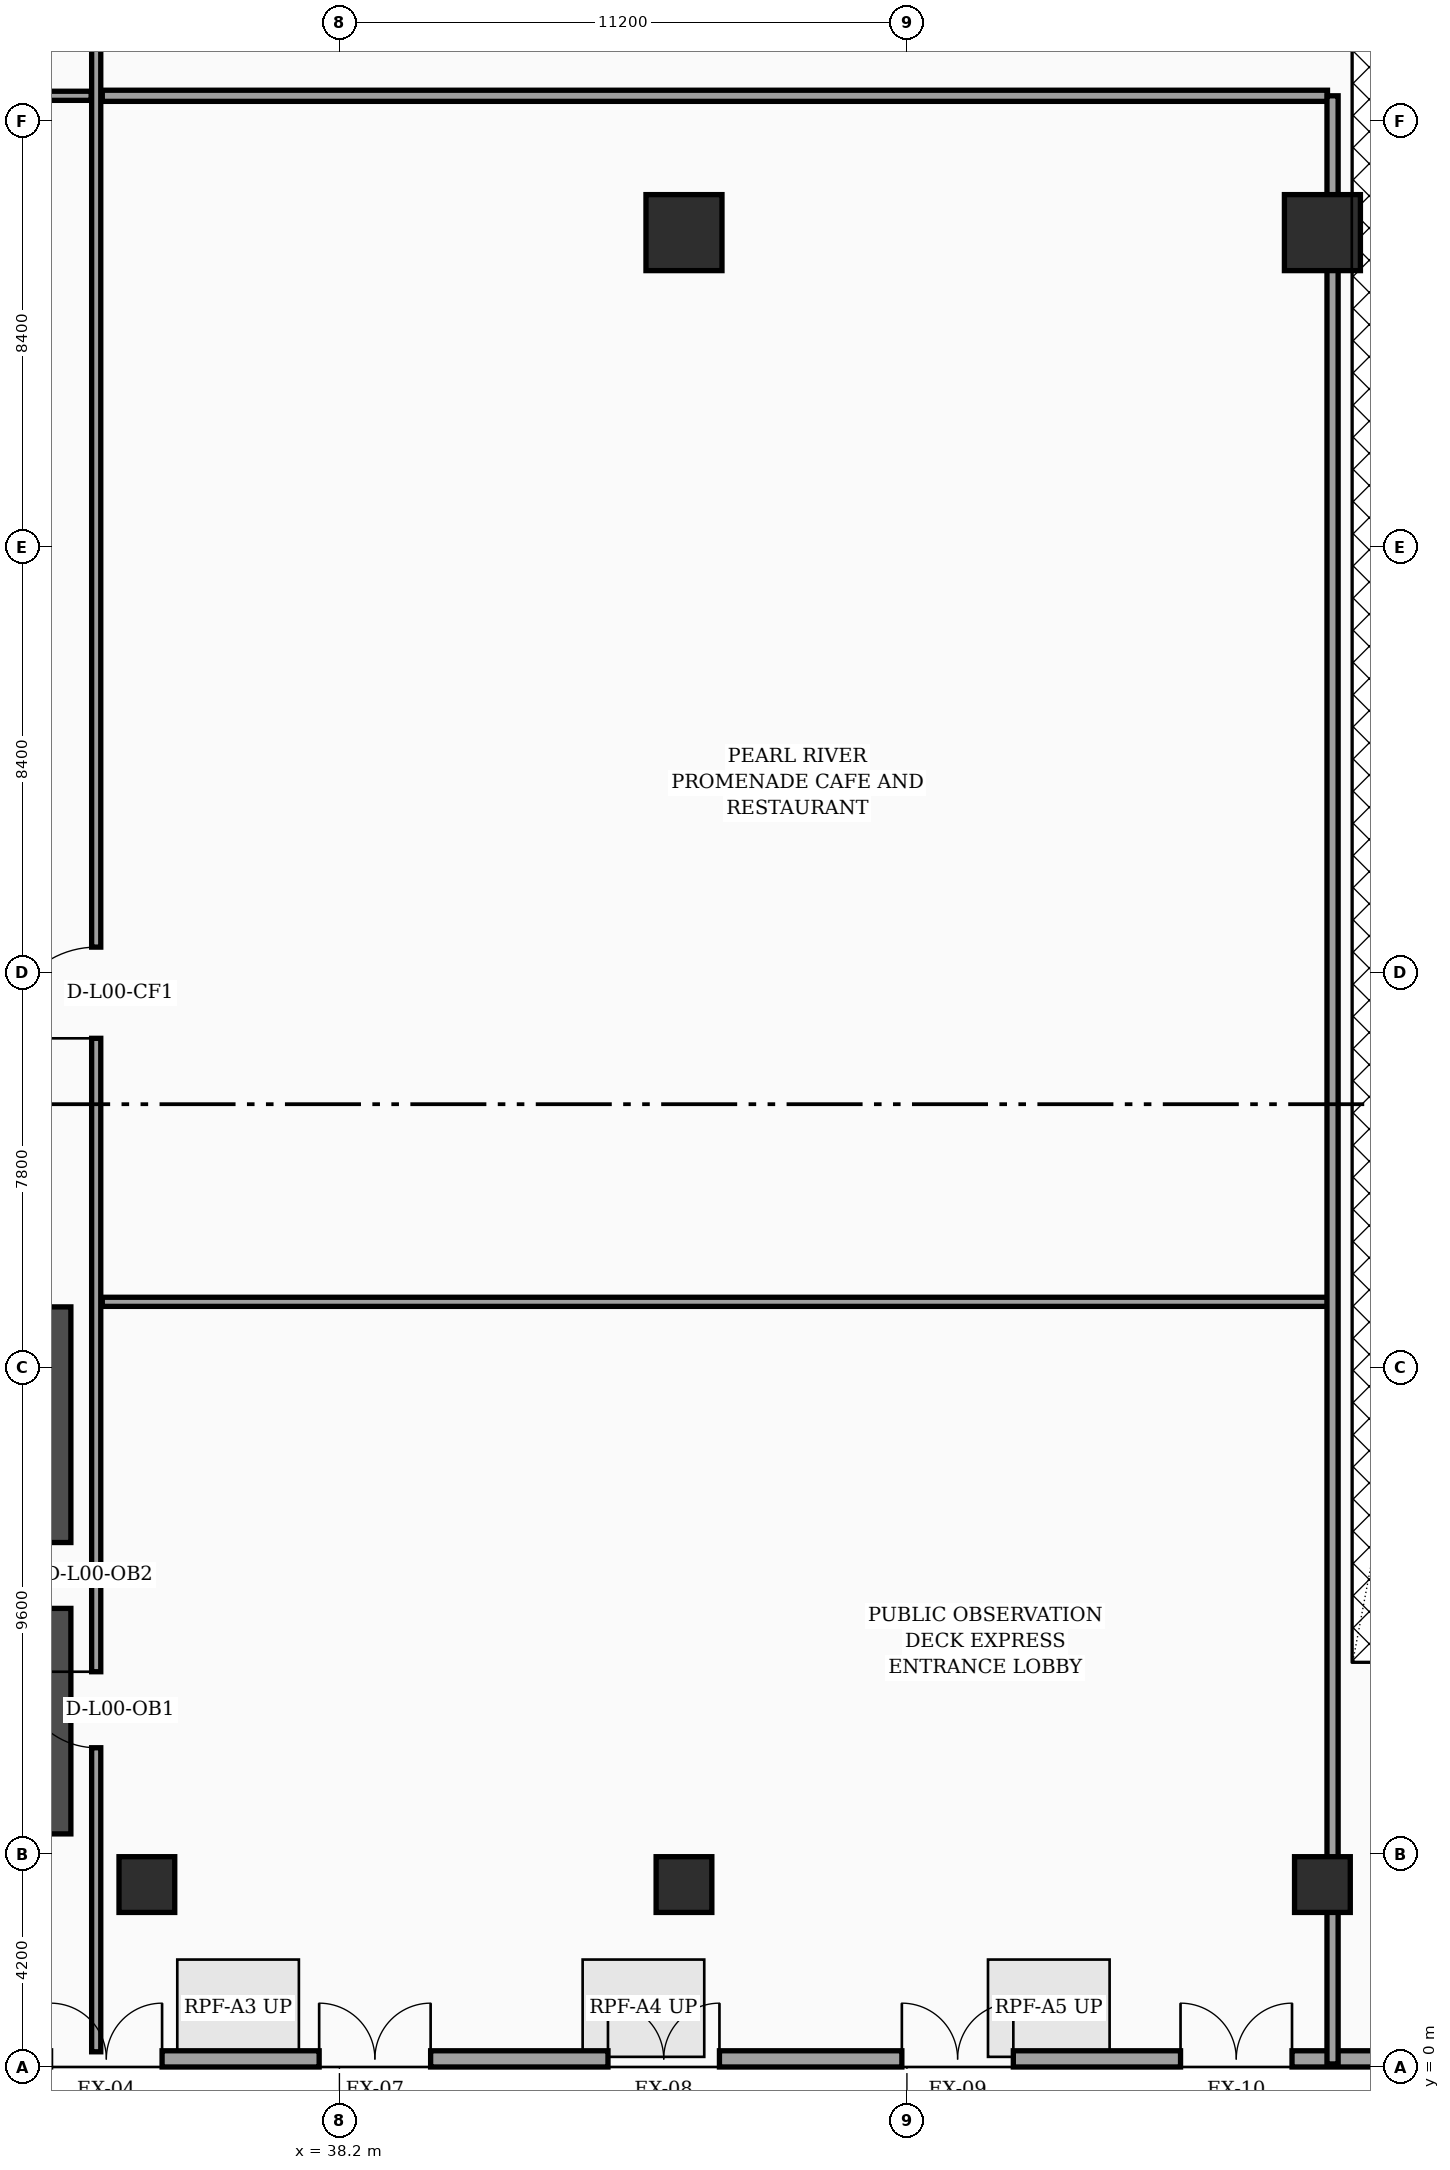
"""IFC4 building model, lengths in metres.
Left out: names, types, materials, properties, quantities, classifications, styles, units other than length and angle.
Written with IfcOpenShell. Run it as: python <this file> out.ifc"""

import sys

from ifc_helpers import new_model, si_unit, direction, frame, frame_2d, origin, origin_2d, place, context, subcontext, project, spatial, rectangle, hollow_rectangle, extrude, element, fill, save


model = new_model("IFC4")
c1 = context("Model", 3, precision=1e-05, world=origin(), true_north=direction((0.0, 1.0)))
c2 = subcontext(c1, "Body", "Model", "MODEL_VIEW")
j1 = project(units=[si_unit("LENGTHUNIT", "METRE"), si_unit("PLANEANGLEUNIT", "RADIAN")], contexts=[c1])
p1 = place(None, origin())
s1 = spatial("IfcSite", under=j1, at=p1, CompositionType="ELEMENT")
p2 = place(p1, origin())
s2 = spatial("IfcBuilding", under=s1, at=p2, CompositionType="ELEMENT")
p3 = place(p2, origin())
s3 = spatial("IfcBuildingStorey", under=s2, at=p3, CompositionType="ELEMENT", Elevation=0.0)
p4 = place(p3, frame((32.4, 4.6, 0.0), z_axis=(0.0, 0.0, 1.0), x_axis=(0.0, 1.0, 0.0)))
e1 = element("IfcWall", 1, at=p4, inside=s3, PredefinedType="SHEAR", context=c2, shape_type="SweptSolid", body=[
    extrude(rectangle(XDim=10.4, YDim=1.0, at=frame_2d((5.2, 0.0))), origin(), (0.0, 0.0, 1.0), 5.68),
])
p5 = place(p4, frame((4.45, 0.0, 0.0)))
e2 = element("IfcOpeningElement", 2, at=p5, cuts=e1, PredefinedType="OPENING", context=c2, shape_type="SweptSolid", body=[
    extrude(rectangle(XDim=1.3, YDim=2.35, at=frame_2d((0.65, 1.175))), frame((0.0, 0.51, 0.0), z_axis=(0.0, -1.0, 0.0), x_axis=(1.0, 0.0, 0.0)), (0.0, 0.0, 1.0), 1.02),
])
for number, where, z_axis, x_axis in (
    (3, (34.4, 3.6, 0.0), (0.0, 0.0, 1.0), (1.0, 0.0, 0.0)),
    (4, (45.0, 3.6, 0.0), (0.0, 0.0, 1.0), (1.0, 0.0, 0.0)),
    (5, (57.6, 3.6, 0.0), (0.0, 0.0, 1.0), (1.0, 0.0, 0.0)),
):
    element("IfcColumn", number, at=place(p3, frame(where, z_axis=z_axis, x_axis=x_axis)), inside=s3, PredefinedType="COLUMN", context=c2, shape_type="SweptSolid", body=[
        extrude(hollow_rectangle(XDim=1.1, YDim=1.1, WallThickness=0.045, at=origin_2d()), origin(), (0.0, 0.0, 1.0), 5.68),
    ])
for number, where, z_axis, x_axis in (
    (6, (45.0, 36.2, 0.0), (0.0, 0.0, 1.0), (1.0, 0.0, 0.0)),
    (7, (57.6, 36.2, 0.0), (0.0, 0.0, 1.0), (1.0, 0.0, 0.0)),
):
    element("IfcColumn", number, at=place(p3, frame(where, z_axis=z_axis, x_axis=x_axis)), inside=s3, PredefinedType="COLUMN", context=c2, shape_type="SweptSolid", body=[
        extrude(rectangle(XDim=1.5, YDim=1.5, at=origin_2d()), origin(), (0.0, 0.0, 1.0), 5.68),
    ])
p6 = place(p3, frame((81.7, 0.16, 0.0), z_axis=(0.0, 0.0, 1.0), x_axis=(-1.0, 0.0, 0.0)))
e8 = element("IfcWall", 8, at=p6, inside=s3, PredefinedType="SOLIDWALL", context=c2, shape_type="SweptSolid", body=[
    extrude(rectangle(XDim=79.4, YDim=0.32, at=frame_2d((39.7, 0.0))), origin(), (0.0, 0.0, 1.0), 5.68),
])
p7 = place(p6, frame((63.0, 0.0, 0.0)))
e9 = element("IfcOpeningElement", 9, at=p7, cuts=e8, PredefinedType="OPENING", context=c2, shape_type="SweptSolid", body=[
    extrude(rectangle(XDim=2.2, YDim=2.5, at=frame_2d((1.1, 1.25))), frame((0.0, 0.17, 0.0), z_axis=(0.0, -1.0, 0.0), x_axis=(1.0, 0.0, 0.0)), (0.0, 0.0, 1.0), 0.34),
])
p8 = place(p6, frame((58.4, 0.0, 0.0)))
e10 = element("IfcOpeningElement", 10, at=p8, cuts=e8, PredefinedType="OPENING", context=c2, shape_type="SweptSolid", body=[
    extrude(rectangle(XDim=2.2, YDim=2.5, at=frame_2d((1.1, 1.25))), frame((0.0, 0.17, 0.0), z_axis=(0.0, -1.0, 0.0), x_axis=(1.0, 0.0, 0.0)), (0.0, 0.0, 1.0), 0.34),
])
p9 = place(p6, frame((53.4, 0.0, 0.0)))
e11 = element("IfcOpeningElement", 11, at=p9, cuts=e8, PredefinedType="OPENING", context=c2, shape_type="SweptSolid", body=[
    extrude(rectangle(XDim=2.2, YDim=2.5, at=frame_2d((1.1, 1.25))), frame((0.0, 0.17, 0.0), z_axis=(0.0, -1.0, 0.0), x_axis=(1.0, 0.0, 0.0)), (0.0, 0.0, 1.0), 0.34),
])
p10 = place(p6, frame((47.0, 0.0, 0.0)))
e12 = element("IfcOpeningElement", 12, at=p10, cuts=e8, PredefinedType="OPENING", context=c2, shape_type="SweptSolid", body=[
    extrude(rectangle(XDim=2.2, YDim=2.5, at=frame_2d((1.1, 1.25))), frame((0.0, 0.17, 0.0), z_axis=(0.0, -1.0, 0.0), x_axis=(1.0, 0.0, 0.0)), (0.0, 0.0, 1.0), 0.34),
])
p11 = place(p6, frame((41.7, 0.0, 0.0)))
e13 = element("IfcOpeningElement", 13, at=p11, cuts=e8, PredefinedType="OPENING", context=c2, shape_type="SweptSolid", body=[
    extrude(rectangle(XDim=2.2, YDim=2.5, at=frame_2d((1.1, 1.25))), frame((0.0, 0.17, 0.0), z_axis=(0.0, -1.0, 0.0), x_axis=(1.0, 0.0, 0.0)), (0.0, 0.0, 1.0), 0.34),
])
p12 = place(p6, frame((36.0, 0.0, 0.0)))
e14 = element("IfcOpeningElement", 14, at=p12, cuts=e8, PredefinedType="OPENING", context=c2, shape_type="SweptSolid", body=[
    extrude(rectangle(XDim=2.2, YDim=2.5, at=frame_2d((1.1, 1.25))), frame((0.0, 0.17, 0.0), z_axis=(0.0, -1.0, 0.0), x_axis=(1.0, 0.0, 0.0)), (0.0, 0.0, 1.0), 0.34),
])
p13 = place(p6, frame((30.2, 0.0, 0.0)))
e15 = element("IfcOpeningElement", 15, at=p13, cuts=e8, PredefinedType="OPENING", context=c2, shape_type="SweptSolid", body=[
    extrude(rectangle(XDim=2.2, YDim=2.5, at=frame_2d((1.1, 1.25))), frame((0.0, 0.17, 0.0), z_axis=(0.0, -1.0, 0.0), x_axis=(1.0, 0.0, 0.0)), (0.0, 0.0, 1.0), 0.34),
])
p14 = place(p6, frame((24.7, 0.0, 0.0)))
e16 = element("IfcOpeningElement", 16, at=p14, cuts=e8, PredefinedType="OPENING", context=c2, shape_type="SweptSolid", body=[
    extrude(rectangle(XDim=2.2, YDim=2.5, at=frame_2d((1.1, 1.25))), frame((0.0, 0.17, 0.0), z_axis=(0.0, -1.0, 0.0), x_axis=(1.0, 0.0, 0.0)), (0.0, 0.0, 1.0), 0.34),
])
p15 = place(p6, frame((71.5, 0.0, 0.8)))
e17 = element("IfcOpeningElement", 17, at=p15, cuts=e8, PredefinedType="OPENING", context=c2, shape_type="SweptSolid", body=[
    extrude(rectangle(XDim=2.4, YDim=2.6, at=frame_2d((1.2, 1.3))), frame((0.0, 0.17, 0.0), z_axis=(0.0, -1.0, 0.0), x_axis=(1.0, 0.0, 0.0)), (0.0, 0.0, 1.0), 0.34),
])
p16 = place(p6, frame((16.5, 0.0, 0.8)))
e18 = element("IfcOpeningElement", 18, at=p16, cuts=e8, PredefinedType="OPENING", context=c2, shape_type="SweptSolid", body=[
    extrude(rectangle(XDim=2.4, YDim=2.6, at=frame_2d((1.2, 1.3))), frame((0.0, 0.17, 0.0), z_axis=(0.0, -1.0, 0.0), x_axis=(1.0, 0.0, 0.0)), (0.0, 0.0, 1.0), 0.34),
])
p17 = place(p6, frame((7.0, 0.0, 0.8)))
e19 = element("IfcOpeningElement", 19, at=p17, cuts=e8, PredefinedType="OPENING", context=c2, shape_type="SweptSolid", body=[
    extrude(rectangle(XDim=2.4, YDim=2.6, at=frame_2d((1.2, 1.3))), frame((0.0, 0.17, 0.0), z_axis=(0.0, -1.0, 0.0), x_axis=(1.0, 0.0, 0.0)), (0.0, 0.0, 1.0), 0.34),
])
p18 = place(p3, frame((15.2, 38.9, 0.0), z_axis=(0.0, 0.0, 1.0), x_axis=(1.0, 0.0, 0.0)))
e20 = element("IfcWall", 20, at=p18, inside=s3, PredefinedType="PARTITIONING", context=c2, shape_type="SweptSolid", body=[
    extrude(rectangle(XDim=18.1, YDim=0.18, at=frame_2d((9.05, 0.0))), origin(), (0.0, 0.0, 1.0), 4.88),
])
p19 = place(p18, frame((2.2, 0.0, 0.0)))
e21 = element("IfcOpeningElement", 21, at=p19, cuts=e20, PredefinedType="OPENING", context=c2, shape_type="SweptSolid", body=[
    extrude(rectangle(XDim=1.02, YDim=2.2, at=frame_2d((0.51, 1.1))), frame((0.0, 0.1, 0.0), z_axis=(0.0, -1.0, 0.0), x_axis=(1.0, 0.0, 0.0)), (0.0, 0.0, 1.0), 0.2),
])
p20 = place(p18, frame((8.2, 0.0, 0.0)))
e22 = element("IfcOpeningElement", 22, at=p20, cuts=e20, PredefinedType="OPENING", context=c2, shape_type="SweptSolid", body=[
    extrude(rectangle(XDim=1.02, YDim=2.2, at=frame_2d((0.51, 1.1))), frame((0.0, 0.1, 0.0), z_axis=(0.0, -1.0, 0.0), x_axis=(1.0, 0.0, 0.0)), (0.0, 0.0, 1.0), 0.2),
])
p21 = place(p18, frame((14.2, 0.0, 0.0)))
e23 = element("IfcOpeningElement", 23, at=p21, cuts=e20, PredefinedType="OPENING", context=c2, shape_type="SweptSolid", body=[
    extrude(rectangle(XDim=1.02, YDim=2.2, at=frame_2d((0.51, 1.1))), frame((0.0, 0.1, 0.0), z_axis=(0.0, -1.0, 0.0), x_axis=(1.0, 0.0, 0.0)), (0.0, 0.0, 1.0), 0.2),
])
p22 = place(p3, frame((33.4, 0.3, 0.0), z_axis=(0.0, 0.0, 1.0), x_axis=(0.0, 1.0, 0.0)))
e24 = element("IfcWall", 24, at=p22, inside=s3, PredefinedType="PARTITIONING", context=c2, shape_type="SweptSolid", body=[
    extrude(rectangle(XDim=57.64, YDim=0.18, at=frame_2d((28.82, 0.0))), origin(), (0.0, 0.0, 1.0), 4.88),
])
p23 = place(p22, frame((6.0, 0.0, 0.0)))
e25 = element("IfcOpeningElement", 25, at=p23, cuts=e24, PredefinedType="OPENING", context=c2, shape_type="SweptSolid", body=[
    extrude(rectangle(XDim=1.5, YDim=2.22, at=frame_2d((0.75, 1.11))), frame((0.0, 0.1, 0.0), z_axis=(0.0, -1.0, 0.0), x_axis=(1.0, 0.0, 0.0)), (0.0, 0.0, 1.0), 0.2),
])
p24 = place(p22, frame((20.0, 0.0, 0.0)))
e26 = element("IfcOpeningElement", 26, at=p24, cuts=e24, PredefinedType="OPENING", context=c2, shape_type="SweptSolid", body=[
    extrude(rectangle(XDim=1.8, YDim=2.4, at=frame_2d((0.9, 1.2))), frame((0.0, 0.1, 0.0), z_axis=(0.0, -1.0, 0.0), x_axis=(1.0, 0.0, 0.0)), (0.0, 0.0, 1.0), 0.2),
])
p25 = place(p22, frame((49.0, 0.0, 0.0)))
e27 = element("IfcOpeningElement", 27, at=p25, cuts=e24, PredefinedType="OPENING", context=c2, shape_type="SweptSolid", body=[
    extrude(rectangle(XDim=1.6, YDim=2.35, at=frame_2d((0.8, 1.175))), frame((0.0, 0.1, 0.0), z_axis=(0.0, -1.0, 0.0), x_axis=(1.0, 0.0, 0.0)), (0.0, 0.0, 1.0), 0.2),
])
p26 = place(p3, frame((33.52, 15.1, 0.0), z_axis=(0.0, 0.0, 1.0), x_axis=(1.0, 0.0, 0.0)))
e28 = element("IfcWall", 28, at=p26, inside=s3, PredefinedType="PARTITIONING", context=c2, shape_type="SweptSolid", body=[
    extrude(rectangle(XDim=24.18, YDim=0.18, at=frame_2d((12.09, 0.0))), origin(), (0.0, 0.0, 1.0), 4.18),
])
p27 = place(p3, frame((33.52, 38.9, 0.0), z_axis=(0.0, 0.0, 1.0), x_axis=(1.0, 0.0, 0.0)))
e29 = element("IfcWall", 29, at=p27, inside=s3, PredefinedType="SOLIDWALL", context=c2, shape_type="SweptSolid", body=[
    extrude(rectangle(XDim=24.18, YDim=0.22, at=frame_2d((12.09, 0.0))), origin(), (0.0, 0.0, 1.0), 4.88),
])
p28 = place(p3, frame((57.8, 0.06, 0.0), z_axis=(0.0, 0.0, 1.0), x_axis=(0.0, 1.0, 0.0)))
e30 = element("IfcWall", 30, at=p28, inside=s3, PredefinedType="SOLIDWALL", context=c2, shape_type="SweptSolid", body=[
    extrude(rectangle(XDim=38.84, YDim=0.22, at=frame_2d((19.42, 0.0))), origin(), (0.0, 0.0, 1.0), 4.18),
])
p29 = place(p10, origin())
e31 = element("IfcDoor", 31, at=p29, inside=s3, OperationType="DOUBLE_DOOR_SINGLE_SWING", PredefinedType="DOOR", context=c2, shape_type="SweptSolid", body=[
    extrude(rectangle(XDim=2.2, YDim=2.5, at=frame_2d((1.1, 1.25))), frame((0.0, 0.025, 0.0), z_axis=(0.0, -1.0, 0.0), x_axis=(1.0, 0.0, 0.0)), (0.0, 0.0, 1.0), 0.05),
])
fill(e12, e31)
p30 = place(p11, origin())
e32 = element("IfcDoor", 32, at=p30, inside=s3, OperationType="DOUBLE_DOOR_SINGLE_SWING", PredefinedType="DOOR", context=c2, shape_type="SweptSolid", body=[
    extrude(rectangle(XDim=2.2, YDim=2.5, at=frame_2d((1.1, 1.25))), frame((0.0, 0.025, 0.0), z_axis=(0.0, -1.0, 0.0), x_axis=(1.0, 0.0, 0.0)), (0.0, 0.0, 1.0), 0.05),
])
fill(e13, e32)
p31 = place(p12, origin())
e33 = element("IfcDoor", 33, at=p31, inside=s3, OperationType="DOUBLE_DOOR_SINGLE_SWING", PredefinedType="DOOR", context=c2, shape_type="SweptSolid", body=[
    extrude(rectangle(XDim=2.2, YDim=2.5, at=frame_2d((1.1, 1.25))), frame((0.0, 0.025, 0.0), z_axis=(0.0, -1.0, 0.0), x_axis=(1.0, 0.0, 0.0)), (0.0, 0.0, 1.0), 0.05),
])
fill(e14, e33)
p32 = place(p13, origin())
e34 = element("IfcDoor", 34, at=p32, inside=s3, OperationType="DOUBLE_DOOR_SINGLE_SWING", PredefinedType="DOOR", context=c2, shape_type="SweptSolid", body=[
    extrude(rectangle(XDim=2.2, YDim=2.5, at=frame_2d((1.1, 1.25))), frame((0.0, 0.025, 0.0), z_axis=(0.0, -1.0, 0.0), x_axis=(1.0, 0.0, 0.0)), (0.0, 0.0, 1.0), 0.05),
])
fill(e15, e34)
p33 = place(p14, origin())
e35 = element("IfcDoor", 35, at=p33, inside=s3, OperationType="DOUBLE_DOOR_SINGLE_SWING", PredefinedType="DOOR", context=c2, shape_type="SweptSolid", body=[
    extrude(rectangle(XDim=2.2, YDim=2.5, at=frame_2d((1.1, 1.25))), frame((0.0, 0.025, 0.0), z_axis=(0.0, -1.0, 0.0), x_axis=(1.0, 0.0, 0.0)), (0.0, 0.0, 1.0), 0.05),
])
fill(e16, e35)
p34 = place(p23, origin())
e36 = element("IfcDoor", 36, at=p34, inside=s3, OperationType="SINGLE_SWING_RIGHT", PredefinedType="DOOR", context=c2, shape_type="SweptSolid", body=[
    extrude(rectangle(XDim=1.5, YDim=2.22, at=frame_2d((0.75, 1.11))), frame((0.0, 0.025, 0.0), z_axis=(0.0, -1.0, 0.0), x_axis=(1.0, 0.0, 0.0)), (0.0, 0.0, 1.0), 0.05),
])
fill(e25, e36)
p35 = place(p24, origin())
e37 = element("IfcDoor", 37, at=p35, inside=s3, OperationType="SINGLE_SWING_LEFT", PredefinedType="DOOR", context=c2, shape_type="SweptSolid", body=[
    extrude(rectangle(XDim=1.8, YDim=2.4, at=frame_2d((0.9, 1.2))), frame((0.0, 0.025, 0.0), z_axis=(0.0, -1.0, 0.0), x_axis=(1.0, 0.0, 0.0)), (0.0, 0.0, 1.0), 0.05),
])
fill(e26, e37)
save(model, sys.argv[1])
